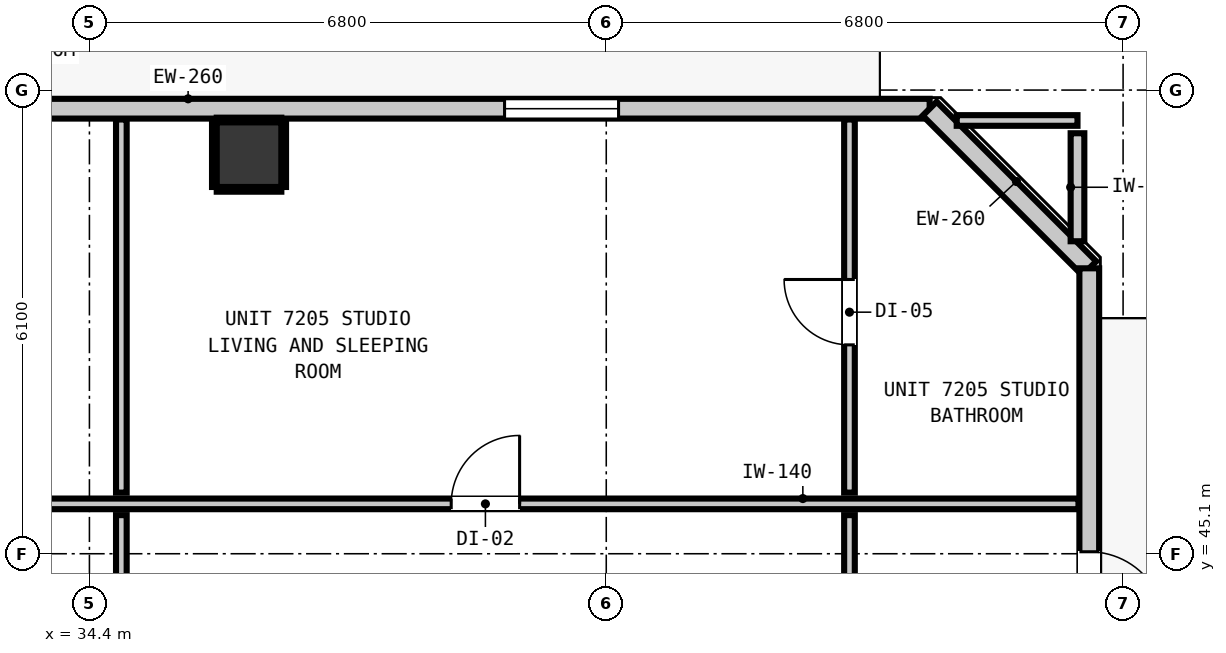
"""IFC4 building model, lengths in metres.
Left out: names, types, materials, properties, quantities, classifications, styles, units other than length and angle.
Written with IfcOpenShell. Run it as: python <this file> out.ifc"""

import sys

from ifc_helpers import new_model, si_unit, direction, frame, frame_2d, origin, origin_2d, place, context, subcontext, project, spatial, rectangle, extrude, element, fill, save


model = new_model("IFC4")
c1 = context("Model", 3, precision=1e-05, world=origin(), true_north=direction((0.0, 1.0)))
c2 = subcontext(c1, "Body", "Model", "MODEL_VIEW")
j1 = project(units=[si_unit("LENGTHUNIT", "METRE"), si_unit("PLANEANGLEUNIT", "RADIAN")], contexts=[c1])
p1 = place(None, origin())
s1 = spatial("IfcSite", under=j1, at=p1, CompositionType="ELEMENT")
p2 = place(p1, origin())
s2 = spatial("IfcBuilding", under=s1, at=p2, CompositionType="ELEMENT")
p3 = place(p2, frame((0.0, 0.0, 247.88)))
s3 = spatial("IfcBuildingStorey", under=s2, at=p3, CompositionType="ELEMENT", Elevation=247.88)
p4 = place(p3, frame((36.5, 50.35, 0.0), z_axis=(0.0, 0.0, 1.0), x_axis=(1.0, 0.0, 0.0)))
e1 = element("IfcColumn", 1, at=p4, inside=s3, PredefinedType="COLUMN", context=c2, shape_type="SweptSolid", body=[
    extrude(rectangle(XDim=0.85, YDim=0.85, at=origin_2d()), origin(), (0.0, 0.0, 1.0), 2.9),
])
p5 = place(p3, frame((12.745, 50.955, 0.0), z_axis=(0.0, 0.0, 1.0), x_axis=(1.0, 0.0, 0.0)))
e2 = element("IfcWall", 2, at=p5, inside=s3, PredefinedType="STANDARD", context=c2, shape_type="SweptSolid", body=[
    extrude(rectangle(XDim=32.71, YDim=0.26, at=frame_2d((16.355, 0.0))), origin(), (0.0, 0.0, 1.0), 2.9),
])
p6 = place(p5, frame((1.61, 0.0, 0.0)))
e3 = element("IfcOpeningElement", 3, at=p6, cuts=e2, PredefinedType="OPENING", context=c2, shape_type="SweptSolid", body=[
    extrude(rectangle(XDim=1.0, YDim=2.15, at=frame_2d((0.5, 1.075))), frame((0.0, 0.14, 0.0), z_axis=(0.0, -1.0, 0.0), x_axis=(1.0, 0.0, 0.0)), (0.0, 0.0, 1.0), 0.28),
])
p7 = place(p5, frame((9.328, 0.0, 0.85)))
e4 = element("IfcOpeningElement", 4, at=p7, cuts=e2, PredefinedType="OPENING", context=c2, shape_type="SweptSolid", body=[
    extrude(rectangle(XDim=1.5, YDim=1.8, at=frame_2d((0.75, 0.9))), frame((0.0, 0.14, 0.0), z_axis=(0.0, -1.0, 0.0), x_axis=(1.0, 0.0, 0.0)), (0.0, 0.0, 1.0), 0.28),
])
p8 = place(p5, frame((17.29, 0.0, 0.85)))
e5 = element("IfcOpeningElement", 5, at=p8, cuts=e2, PredefinedType="OPENING", context=c2, shape_type="SweptSolid", body=[
    extrude(rectangle(XDim=1.5, YDim=1.8, at=frame_2d((0.75, 0.9))), frame((0.0, 0.14, 0.0), z_axis=(0.0, -1.0, 0.0), x_axis=(1.0, 0.0, 0.0)), (0.0, 0.0, 1.0), 0.28),
])
p9 = place(p5, frame((27.117, 0.0, 0.85)))
e6 = element("IfcOpeningElement", 6, at=p9, cuts=e2, PredefinedType="OPENING", context=c2, shape_type="SweptSolid", body=[
    extrude(rectangle(XDim=1.5, YDim=1.8, at=frame_2d((0.75, 0.9))), frame((0.0, 0.14, 0.0), z_axis=(0.0, -1.0, 0.0), x_axis=(1.0, 0.0, 0.0)), (0.0, 0.0, 1.0), 0.28),
])
p10 = place(p3, frame((45.455, 50.955, 0.0), z_axis=(0.0, 0.0, 1.0), x_axis=(0.707065676302, -0.707147883682, 0.0)))
e7 = element("IfcWall", 7, at=p10, inside=s3, PredefinedType="STANDARD", context=c2, shape_type="SweptSolid", body=[
    extrude(rectangle(XDim=2.97, YDim=0.26, at=frame_2d((1.485, 0.0))), origin(), (0.0, 0.0, 1.0), 2.9),
])
p11 = place(p3, frame((47.555, 48.855, 0.0), z_axis=(0.0, 0.0, 1.0), x_axis=(0.0, -1.0, 0.0)))
e8 = element("IfcWall", 8, at=p11, inside=s3, PredefinedType="STANDARD", context=c2, shape_type="SweptSolid", body=[
    extrude(rectangle(XDim=30.31, YDim=0.26, at=frame_2d((15.155, 0.0))), origin(), (0.0, 0.0, 1.0), 2.9),
])
p12 = place(p11, frame((3.729, 0.0, 0.0)))
e9 = element("IfcOpeningElement", 9, at=p12, cuts=e8, PredefinedType="OPENING", context=c2, shape_type="SweptSolid", body=[
    extrude(rectangle(XDim=1.0, YDim=2.15, at=frame_2d((0.5, 1.075))), frame((0.0, 0.14, 0.0), z_axis=(0.0, -1.0, 0.0), x_axis=(1.0, 0.0, 0.0)), (0.0, 0.0, 1.0), 0.28),
])
p13 = place(p3, frame((32.046, 45.756, 0.0), z_axis=(0.0, 0.0, 1.0), x_axis=(1.0, 0.0, 0.0)))
e10 = element("IfcWall", 10, at=p13, inside=s3, PredefinedType="PARTITIONING", context=c2, shape_type="SweptSolid", body=[
    extrude(rectangle(XDim=15.367, YDim=0.14, at=frame_2d((7.684, 0.0))), origin(), (0.0, 0.0, 1.0), 2.9),
])
p14 = place(p13, frame((7.114, 0.0, 0.0)))
e11 = element("IfcOpeningElement", 11, at=p14, cuts=e10, PredefinedType="OPENING", context=c2, shape_type="SweptSolid", body=[
    extrude(rectangle(XDim=0.9, YDim=2.1, at=frame_2d((0.45, 1.05))), frame((0.0, 0.08, 0.0), z_axis=(0.0, -1.0, 0.0), x_axis=(1.0, 0.0, 0.0)), (0.0, 0.0, 1.0), 0.16),
])
p15 = place(p3, frame((45.811, 50.8, 0.0), z_axis=(0.0, 0.0, 1.0), x_axis=(1.0, 0.0, 0.0)))
e12 = element("IfcWall", 12, at=p15, inside=s3, PredefinedType="PARTITIONING", context=c2, shape_type="SweptSolid", body=[
    extrude(rectangle(XDim=1.589, YDim=0.14, at=frame_2d((0.794, 0.0))), origin(), (0.0, 0.0, 1.0), 2.9),
])
p16 = place(p3, frame((47.4, 49.211, 0.0), z_axis=(0.0, 0.0, 1.0), x_axis=(0.0, 1.0, 0.0)))
e13 = element("IfcWall", 13, at=p16, inside=s3, PredefinedType="PARTITIONING", context=c2, shape_type="SweptSolid", body=[
    extrude(rectangle(XDim=1.421, YDim=0.18, at=frame_2d((0.71, 0.0))), origin(), (0.0, 0.0, 1.0), 2.9),
])
p17 = place(p3, frame((34.82, 42.118, 0.0), z_axis=(0.0, 0.0, 1.0), x_axis=(0.0, 1.0, 0.0)))
e14 = element("IfcWall", 14, at=p17, inside=s3, PredefinedType="PARTITIONING", context=c2, shape_type="SweptSolid", body=[
    extrude(rectangle(XDim=3.49, YDim=0.14, at=frame_2d((1.745, 0.0))), origin(), (0.0, 0.0, 1.0), 2.9),
])
p18 = place(p3, frame((34.82, 45.904, 0.0), z_axis=(0.0, 0.0, 1.0), x_axis=(0.0, 1.0, 0.0)))
e15 = element("IfcWall", 15, at=p18, inside=s3, PredefinedType="PARTITIONING", context=c2, shape_type="SweptSolid", body=[
    extrude(rectangle(XDim=4.909, YDim=0.14, at=frame_2d((2.455, 0.0))), origin(), (0.0, 0.0, 1.0), 2.9),
])
p19 = place(p3, frame((44.4, 42.118, 0.0), z_axis=(0.0, 0.0, 1.0), x_axis=(0.0, 1.0, 0.0)))
e16 = element("IfcWall", 16, at=p19, inside=s3, PredefinedType="PARTITIONING", context=c2, shape_type="SweptSolid", body=[
    extrude(rectangle(XDim=3.49, YDim=0.14, at=frame_2d((1.745, 0.0))), origin(), (0.0, 0.0, 1.0), 2.9),
])
p20 = place(p19, frame((1.285, 0.0, 0.0)))
e17 = element("IfcOpeningElement", 17, at=p20, cuts=e16, PredefinedType="OPENING", context=c2, shape_type="SweptSolid", body=[
    extrude(rectangle(XDim=0.9, YDim=2.1, at=frame_2d((0.45, 1.05))), frame((0.0, 0.08, 0.0), z_axis=(0.0, -1.0, 0.0), x_axis=(1.0, 0.0, 0.0)), (0.0, 0.0, 1.0), 0.16),
])
p21 = place(p3, frame((44.4, 45.904, 0.0), z_axis=(0.0, 0.0, 1.0), x_axis=(0.0, 1.0, 0.0)))
e18 = element("IfcWall", 18, at=p21, inside=s3, PredefinedType="PARTITIONING", context=c2, shape_type="SweptSolid", body=[
    extrude(rectangle(XDim=4.909, YDim=0.14, at=frame_2d((2.455, 0.0))), origin(), (0.0, 0.0, 1.0), 2.9),
])
p22 = place(p21, frame((1.944, 0.0, 0.0)))
e19 = element("IfcOpeningElement", 19, at=p22, cuts=e18, PredefinedType="OPENING", context=c2, shape_type="SweptSolid", body=[
    extrude(rectangle(XDim=0.86, YDim=2.02, at=frame_2d((0.43, 1.01))), frame((0.0, 0.08, 0.0), z_axis=(0.0, -1.0, 0.0), x_axis=(1.0, 0.0, 0.0)), (0.0, 0.0, 1.0), 0.16),
])
for number, where, z_axis, x_axis in (
    (20, (36.075, 49.893, 0.0), (0.0, 0.0, 1.0), (1.0, 0.0, 0.0)),
    (21, (36.075, 50.807, 0.0), (0.0, 0.0, 1.0), (1.0, 0.0, 0.0)),
):
    element("IfcWall", number, at=place(p3, frame(where, z_axis=z_axis, x_axis=x_axis)), inside=s3, PredefinedType="PARTITIONING", context=c2, shape_type="SweptSolid", body=[
        extrude(rectangle(XDim=0.85, YDim=0.06, at=frame_2d((0.425, 0.0))), origin(), (0.0, 0.0, 1.0), 1.45),
    ])
for number, where, z_axis, x_axis in (
    (22, (36.043, 49.925, 0.0), (0.0, 0.0, 1.0), (0.0, 1.0, 0.0)),
    (23, (36.957, 49.925, 0.0), (0.0, 0.0, 1.0), (0.0, 1.0, 0.0)),
):
    element("IfcWall", number, at=place(p3, frame(where, z_axis=z_axis, x_axis=x_axis)), inside=s3, PredefinedType="PARTITIONING", context=c2, shape_type="SweptSolid", body=[
        extrude(rectangle(XDim=0.85, YDim=0.06, at=frame_2d((0.425, 0.0))), origin(), (0.0, 0.0, 1.0), 0.905),
    ])
p23 = place(p12, origin())
e24 = element("IfcDoor", 24, at=p23, inside=s3, OperationType="SINGLE_SWING_RIGHT", PredefinedType="DOOR", context=c2, shape_type="SweptSolid", body=[
    extrude(rectangle(XDim=1.0, YDim=2.15, at=frame_2d((0.5, 1.075))), frame((0.0, 0.025, 0.0), z_axis=(0.0, -1.0, 0.0), x_axis=(1.0, 0.0, 0.0)), (0.0, 0.0, 1.0), 0.05),
])
fill(e9, e24)
p24 = place(p9, origin())
e25 = element("IfcWindow", 25, at=p24, inside=s3, PartitioningType="SINGLE_PANEL", PredefinedType="WINDOW", context=c2, shape_type="SweptSolid", body=[
    extrude(rectangle(XDim=1.5, YDim=1.8, at=frame_2d((0.75, 0.9))), frame((0.0, 0.03, 0.0), z_axis=(0.0, -1.0, 0.0), x_axis=(1.0, 0.0, 0.0)), (0.0, 0.0, 1.0), 0.06),
])
fill(e6, e25)
p25 = place(p14, origin())
e26 = element("IfcDoor", 26, at=p25, inside=s3, OperationType="SINGLE_SWING_RIGHT", PredefinedType="DOOR", context=c2, shape_type="SweptSolid", body=[
    extrude(rectangle(XDim=0.9, YDim=2.1, at=frame_2d((0.45, 1.05))), frame((0.0, 0.025, 0.0), z_axis=(0.0, -1.0, 0.0), x_axis=(1.0, 0.0, 0.0)), (0.0, 0.0, 1.0), 0.05),
])
fill(e11, e26)
p26 = place(p22, origin())
e27 = element("IfcDoor", 27, at=p26, inside=s3, OperationType="SINGLE_SWING_RIGHT", PredefinedType="DOOR", context=c2, shape_type="SweptSolid", body=[
    extrude(rectangle(XDim=0.86, YDim=2.02, at=frame_2d((0.43, 1.01))), frame((0.0, 0.025, 0.0), z_axis=(0.0, -1.0, 0.0), x_axis=(1.0, 0.0, 0.0)), (0.0, 0.0, 1.0), 0.05),
])
fill(e19, e27)
save(model, sys.argv[1])
